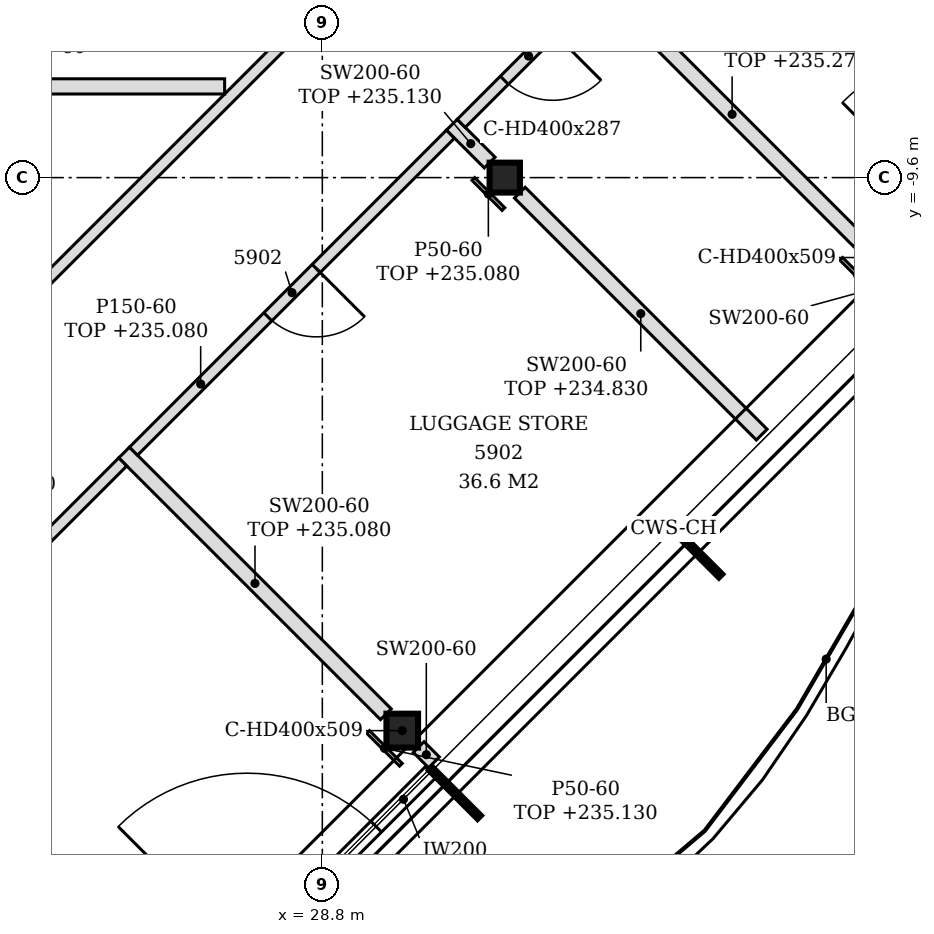
"""IFC4 building model, lengths in metres.
Left out: names, types, materials, properties, quantities, classifications, styles, units other than length and angle.
Written with IfcOpenShell. Run it as: python <this file> out.ifc"""

import sys

from ifc_helpers import new_model, si_unit, direction, frame, frame_2d, origin, origin_2d, place, context, subcontext, project, spatial, rectangle, i_section, extrude, element, fill, save


model = new_model("IFC4")
c1 = context("Model", 3, precision=1e-05, world=origin(), true_north=direction((0.0, 1.0)))
c2 = subcontext(c1, "Body", "Model", "MODEL_VIEW")
j1 = project(units=[si_unit("LENGTHUNIT", "METRE"), si_unit("PLANEANGLEUNIT", "RADIAN")], contexts=[c1])
p1 = place(None, origin())
s1 = spatial("IfcSite", under=j1, at=p1, CompositionType="ELEMENT")
p2 = place(p1, origin())
s2 = spatial("IfcBuilding", under=s1, at=p2, CompositionType="ELEMENT")
p3 = place(p2, frame((0.0, 0.0, 232.2)))
s3 = spatial("IfcBuildingStorey", under=s2, at=p3, CompositionType="ELEMENT", Elevation=232.2)
p4 = place(p3, frame((29.852, -16.876, -0.15), z_axis=(0.0, 0.0, 1.0), x_axis=(1.0, 0.0, 0.0)))
e1 = element("IfcColumn", 1, at=p4, inside=s3, PredefinedType="COLUMN", context=c2, shape_type="SweptSolid", body=[
    extrude(i_section(OverallWidth=0.416, OverallDepth=0.446, WebThickness=0.039, FlangeThickness=0.063, FilletRadius=0.015, at=origin_2d()), origin(), (0.0, 0.0, 1.0), 3.6),
])
p5 = place(p3, frame((31.2, -9.6, -0.15), z_axis=(0.0, 0.0, 1.0), x_axis=(1.0, 0.0, 0.0)))
e2 = element("IfcColumn", 2, at=p5, inside=s3, PredefinedType="COLUMN", context=c2, shape_type="SweptSolid", body=[
    extrude(i_section(OverallWidth=0.399, OverallDepth=0.393, WebThickness=0.023, FlangeThickness=0.037, FilletRadius=0.015, at=origin_2d()), origin(), (0.0, 0.0, 1.0), 3.6),
])
p6 = place(p3, frame((27.093, -20.553, 0.0), z_axis=(0.0, 0.0, 1.0), x_axis=(0.707079231393, 0.707134329907, 0.0)))
e3 = element("IfcWall", 3, at=p6, inside=s3, PredefinedType="NOTDEFINED", context=c2, shape_type="SweptSolid", body=[
    extrude(rectangle(XDim=4.431, YDim=0.2, at=frame_2d((2.215, 0.0))), origin(), (0.0, 0.0, 1.0), 3.45),
])
p7 = place(p6, frame((1.015, 0.0, 0.0)))
e4 = element("IfcOpeningElement", 4, at=p7, cuts=e3, PredefinedType="OPENING", context=c2, shape_type="SweptSolid", body=[
    extrude(rectangle(XDim=2.4, YDim=2.4, at=frame_2d((1.2, 1.2))), frame((0.0, 0.11, 0.0), z_axis=(0.0, -1.0, 0.0), x_axis=(1.0, 0.0, 0.0)), (0.0, 0.0, 1.0), 0.22),
])
p8 = place(p3, frame((21.643, -17.872, 0.0), z_axis=(0.0, 0.0, 1.0), x_axis=(0.707106781187, 0.707106781187, 0.0)))
e5 = element("IfcWall", 5, at=p8, inside=s3, PredefinedType="PARTITIONING", context=c2, shape_type="SweptSolid", body=[
    extrude(rectangle(XDim=6.408, YDim=0.15, at=frame_2d((3.204, 0.0))), origin(), (0.0, 0.0, 1.0), 2.88),
])
p9 = place(p8, frame((2.713, 0.0, 0.0)))
e6 = element("IfcOpeningElement", 6, at=p9, cuts=e5, PredefinedType="OPENING", context=c2, shape_type="SweptSolid", body=[
    extrude(rectangle(XDim=0.9, YDim=2.1, at=frame_2d((0.45, 1.05))), frame((0.0, 0.085, 0.0), z_axis=(0.0, -1.0, 0.0), x_axis=(1.0, 0.0, 0.0)), (0.0, 0.0, 1.0), 0.17),
])
p10 = place(p3, frame((30.269, -17.293, 0.0), z_axis=(0.0, 0.0, 1.0), x_axis=(-0.707534941396, 0.706678361564, 0.0)))
e7 = element("IfcWall", 7, at=p10, inside=s3, PredefinedType="PARTITIONING", context=c2, shape_type="SweptSolid", body=[
    extrude(rectangle(XDim=0.285, YDim=0.2, at=frame_2d((0.143, 0.0))), origin(), (0.0, 0.0, 1.0), 3.45),
])
p11 = place(p3, frame((29.636, -16.66, 0.0), z_axis=(0.0, 0.0, 1.0), x_axis=(-0.707207037357, 0.707006510799, 0.0)))
e8 = element("IfcWall", 8, at=p11, inside=s3, PredefinedType="PARTITIONING", context=c2, shape_type="SweptSolid", body=[
    extrude(rectangle(XDim=4.87, YDim=0.2, at=frame_2d((2.435, 0.0))), origin(), (0.0, 0.0, 1.0), 2.88),
])
p12 = place(p3, frame((26.316, -13.199, 0.0), z_axis=(0.0, 0.0, 1.0), x_axis=(0.707024001185, 0.707189551498, 0.0)))
e9 = element("IfcWall", 9, at=p12, inside=s3, PredefinedType="PARTITIONING", context=c2, shape_type="SweptSolid", body=[
    extrude(rectangle(XDim=5.899, YDim=0.15, at=frame_2d((2.949, 0.0))), origin(), (0.0, 0.0, 1.0), 2.88),
])
p13 = place(p12, frame((2.5, 0.0, 0.0)))
e10 = element("IfcOpeningElement", 10, at=p13, cuts=e9, PredefinedType="OPENING", context=c2, shape_type="SweptSolid", body=[
    extrude(rectangle(XDim=0.9, YDim=2.1, at=frame_2d((0.45, 1.05))), frame((0.0, 0.085, 0.0), z_axis=(0.0, -1.0, 0.0), x_axis=(1.0, 0.0, 0.0)), (0.0, 0.0, 1.0), 0.17),
])
p14 = place(p3, frame((34.581, -12.981, 0.0), z_axis=(0.0, 0.0, 1.0), x_axis=(-0.707133900936, 0.707079660397, 0.0)))
e11 = element("IfcWall", 11, at=p14, inside=s3, PredefinedType="PARTITIONING", context=c2, shape_type="SweptSolid", body=[
    extrude(rectangle(XDim=4.501, YDim=0.2, at=frame_2d((2.25, 0.0))), origin(), (0.0, 0.0, 1.0), 2.63),
])
p15 = place(p3, frame((24.468, -11.653, 0.0), z_axis=(0.0, 0.0, 1.0), x_axis=(0.707095889299, 0.707117672906, 0.0)))
e12 = element("IfcWall", 12, at=p15, inside=s3, PredefinedType="PARTITIONING", context=c2, shape_type="SweptSolid", body=[
    extrude(rectangle(XDim=11.208, YDim=0.15, at=frame_2d((5.604, 0.0))), origin(), (0.0, 0.0, 1.0), 2.88),
])
p16 = place(p3, frame((35.86, -10.436, 0.0), z_axis=(0.0, 0.0, 1.0), x_axis=(-0.707106781187, 0.707106781187, 0.0)))
e13 = element("IfcWall", 13, at=p16, inside=s3, PredefinedType="PARTITIONING", context=c2, shape_type="SweptSolid", body=[
    extrude(rectangle(XDim=4.721, YDim=0.2, at=frame_2d((2.36, 0.0))), origin(), (0.0, 0.0, 1.0), 3.07),
])
p17 = place(p3, frame((31.002, -9.402, 0.0), z_axis=(0.0, 0.0, 1.0), x_axis=(-0.707106781187, 0.707106781187, 0.0)))
e14 = element("IfcWall", 14, at=p17, inside=s3, PredefinedType="PARTITIONING", context=c2, shape_type="SweptSolid", body=[
    extrude(rectangle(XDim=0.704, YDim=0.2, at=frame_2d((0.352, 0.0))), origin(), (0.0, 0.0, 1.0), 2.93),
])
p18 = place(p3, frame((30.628, -8.886, 0.0), z_axis=(0.0, 0.0, 1.0), x_axis=(0.707106781187, 0.707106781187, 0.0)))
e15 = element("IfcWall", 15, at=p18, inside=s3, PredefinedType="PARTITIONING", context=c2, shape_type="SweptSolid", body=[
    extrude(rectangle(XDim=2.604, YDim=0.15, at=frame_2d((1.302, 0.0))), origin(), (0.0, 0.0, 1.0), 2.93),
])
p19 = place(p18, frame((0.802, 0.0, 0.0)))
e16 = element("IfcOpeningElement", 16, at=p19, cuts=e15, PredefinedType="OPENING", context=c2, shape_type="SweptSolid", body=[
    extrude(rectangle(XDim=0.9, YDim=2.1, at=frame_2d((0.45, 1.05))), frame((0.0, 0.085, 0.0), z_axis=(0.0, -1.0, 0.0), x_axis=(1.0, 0.0, 0.0)), (0.0, 0.0, 1.0), 0.17),
])
p20 = place(p3, frame((21.527, -8.4, 0.0), z_axis=(0.0, 0.0, 1.0), x_axis=(1.0, 0.0, 0.0)))
e17 = element("IfcWall", 17, at=p20, inside=s3, PredefinedType="PARTITIONING", context=c2, shape_type="SweptSolid", body=[
    extrude(rectangle(XDim=5.988, YDim=0.2, at=frame_2d((2.994, 0.0))), origin(), (0.0, 0.0, 1.0), 3.45),
])
p21 = place(p3, frame((29.834, -17.324, 0.0), z_axis=(0.0, 0.0, 1.0), x_axis=(-0.707106781187, 0.707106781187, 0.0)))
e18 = element("IfcWall", 18, at=p21, inside=s3, PredefinedType="PARTITIONING", context=c2, shape_type="SweptSolid", body=[
    extrude(rectangle(XDim=0.61, YDim=0.05, at=frame_2d((0.305, 0.0))), origin(), (0.0, 0.0, 1.0), 2.93),
])
p22 = place(p3, frame((31.182, -10.014, 0.0), z_axis=(0.0, 0.0, 1.0), x_axis=(-0.707106781187, 0.707106781187, 0.0)))
e19 = element("IfcWall", 19, at=p22, inside=s3, PredefinedType="PARTITIONING", context=c2, shape_type="SweptSolid", body=[
    extrude(rectangle(XDim=0.56, YDim=0.05, at=frame_2d((0.28, 0.0))), origin(), (0.0, 0.0, 1.0), 2.88),
])
p23 = place(p3, frame((36.058, -11.1, 0.0), z_axis=(0.0, 0.0, 1.0), x_axis=(-0.707307009627, 0.706906496032, 0.0)))
e20 = element("IfcWall", 20, at=p23, inside=s3, PredefinedType="PARTITIONING", context=c2, shape_type="SweptSolid", body=[
    extrude(rectangle(XDim=0.61, YDim=0.05, at=frame_2d((0.305, 0.0))), origin(), (0.0, 0.0, 1.0), 2.63),
])
p24 = place(p7, origin())
e21 = element("IfcDoor", 21, at=p24, inside=s3, OperationType="SINGLE_SWING_LEFT", PredefinedType="DOOR", context=c2, shape_type="SweptSolid", body=[
    extrude(rectangle(XDim=2.4, YDim=2.4, at=frame_2d((1.2, 1.2))), frame((0.0, 0.025, 0.0), z_axis=(0.0, -1.0, 0.0), x_axis=(1.0, 0.0, 0.0)), (0.0, 0.0, 1.0), 0.05),
])
fill(e4, e21)
p25 = place(p13, frame((0.9, 0.0, 0.0), z_axis=(0.0, 0.0, 1.0), x_axis=(-1.0, 0.0, 0.0)))
e22 = element("IfcDoor", 22, at=p25, inside=s3, OperationType="SINGLE_SWING_LEFT", PredefinedType="DOOR", context=c2, shape_type="SweptSolid", body=[
    extrude(rectangle(XDim=0.9, YDim=2.1, at=frame_2d((0.45, 1.05))), frame((0.0, 0.025, 0.0), z_axis=(0.0, -1.0, 0.0), x_axis=(1.0, 0.0, 0.0)), (0.0, 0.0, 1.0), 0.05),
])
fill(e10, e22)
p26 = place(p19, frame((0.9, 0.0, 0.0), z_axis=(0.0, 0.0, 1.0), x_axis=(-1.0, 0.0, 0.0)))
e23 = element("IfcDoor", 23, at=p26, inside=s3, OperationType="SINGLE_SWING_LEFT", PredefinedType="DOOR", context=c2, shape_type="SweptSolid", body=[
    extrude(rectangle(XDim=0.9, YDim=2.1, at=frame_2d((0.45, 1.05))), frame((0.0, 0.025, 0.0), z_axis=(0.0, -1.0, 0.0), x_axis=(1.0, 0.0, 0.0)), (0.0, 0.0, 1.0), 0.05),
])
fill(e16, e23)
save(model, sys.argv[1])
